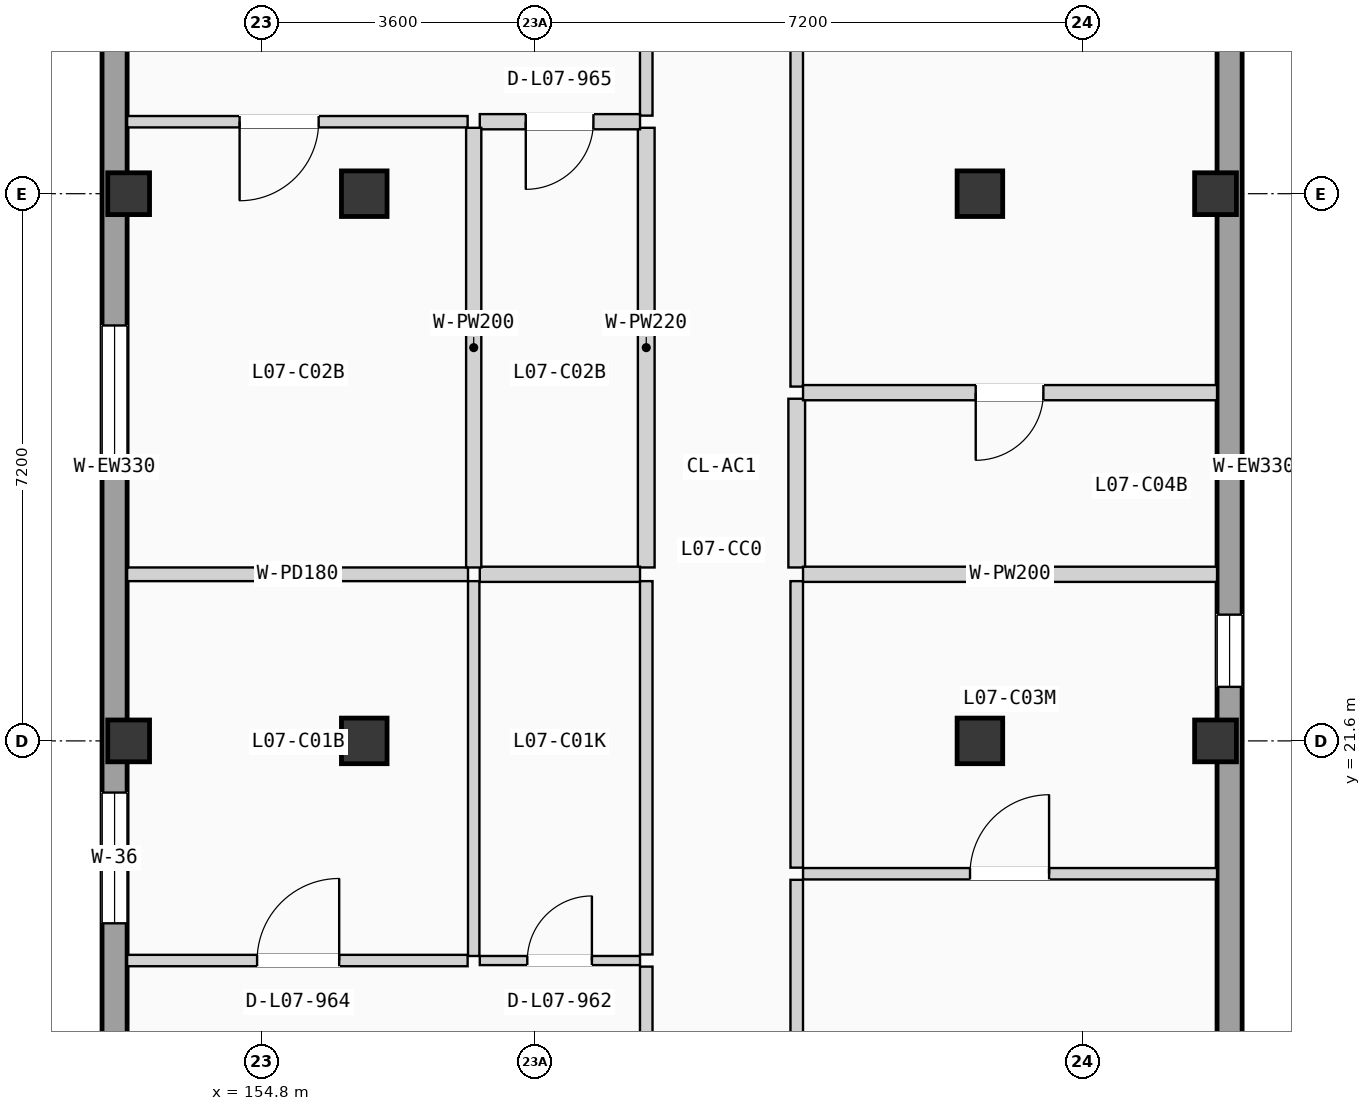
"""IFC4 building model, lengths in metres.
Left out: names, types, materials, properties, quantities, classifications, styles, units other than length and angle.
Written with IfcOpenShell. Run it as: python <this file> out.ifc"""

import sys

from ifc_helpers import new_model, si_unit, direction, frame, frame_2d, origin, origin_2d, place, context, subcontext, project, spatial, rectangle, extrude, element, fill, save


model = new_model("IFC4")
c1 = context("Model", 3, precision=1e-05, world=origin(), true_north=direction((0.0, 1.0)))
c2 = subcontext(c1, "Body", "Model", "MODEL_VIEW")
j1 = project(units=[si_unit("LENGTHUNIT", "METRE"), si_unit("PLANEANGLEUNIT", "RADIAN")], contexts=[c1])
p1 = place(None, origin())
s1 = spatial("IfcSite", under=j1, at=p1, CompositionType="ELEMENT")
p2 = place(p1, origin())
s2 = spatial("IfcBuilding", under=s1, at=p2, CompositionType="ELEMENT")
p3 = place(p2, frame((0.0, 0.0, 24.675)))
s3 = spatial("IfcBuildingStorey", under=s2, at=p3, CompositionType="ELEMENT", Elevation=24.675)
for number, where, z_axis, x_axis in (
    (1, (153.05, 21.6, 0.0), (0.0, 0.0, 1.0), (1.0, 0.0, 0.0)),
    (2, (153.05, 28.8, 0.0), (0.0, 0.0, 1.0), (1.0, 0.0, 0.0)),
):
    element("IfcColumn", number, at=place(p3, frame(where, z_axis=z_axis, x_axis=x_axis)), inside=s3, PredefinedType="COLUMN", context=c2, shape_type="SweptSolid", body=[
        extrude(rectangle(XDim=0.55, YDim=0.55, at=origin_2d()), origin(), (0.0, 0.0, 1.0), 3.15),
    ])
for number, where, z_axis, x_axis in (
    (3, (156.15, 21.6, 0.0), (0.0, 0.0, 1.0), (1.0, 0.0, 0.0)),
    (4, (156.15, 28.8, 0.0), (0.0, 0.0, 1.0), (1.0, 0.0, 0.0)),
    (5, (164.25, 21.6, 0.0), (0.0, 0.0, 1.0), (1.0, 0.0, 0.0)),
    (6, (164.25, 28.8, 0.0), (0.0, 0.0, 1.0), (1.0, 0.0, 0.0)),
):
    element("IfcColumn", number, at=place(p3, frame(where, z_axis=z_axis, x_axis=x_axis)), inside=s3, PredefinedType="COLUMN", context=c2, shape_type="SweptSolid", body=[
        extrude(rectangle(XDim=0.6, YDim=0.6, at=origin_2d()), origin(), (0.0, 0.0, 1.0), 3.15),
    ])
for number, where, z_axis, x_axis in (
    (7, (167.35, 21.6, 0.0), (0.0, 0.0, 1.0), (1.0, 0.0, 0.0)),
    (8, (167.35, 28.8, 0.0), (0.0, 0.0, 1.0), (1.0, 0.0, 0.0)),
):
    element("IfcColumn", number, at=place(p3, frame(where, z_axis=z_axis, x_axis=x_axis)), inside=s3, PredefinedType="COLUMN", context=c2, shape_type="SweptSolid", body=[
        extrude(rectangle(XDim=0.55, YDim=0.55, at=origin_2d()), origin(), (0.0, 0.0, 1.0), 3.15),
    ])
p4 = place(p3, frame((152.865, 0.33, 0.0), z_axis=(0.0, 0.0, 1.0), x_axis=(0.0, 1.0, 0.0)))
e9 = element("IfcWall", 9, at=p4, inside=s3, PredefinedType="SOLIDWALL", context=c2, shape_type="SweptSolid", body=[
    extrude(rectangle(XDim=49.74, YDim=0.33, at=frame_2d((24.87, 0.0))), origin(), (0.0, 0.0, 1.0), 2.9),
])
p5 = place(p4, frame((15.52, 0.0, 0.565)))
e10 = element("IfcOpeningElement", 10, at=p5, cuts=e9, PredefinedType="OPENING", context=c2, shape_type="SweptSolid", body=[
    extrude(rectangle(XDim=1.6, YDim=1.65, at=frame_2d((0.8, 0.825))), frame((0.0, 0.175, 0.0), z_axis=(0.0, -1.0, 0.0), x_axis=(1.0, 0.0, 0.0)), (0.0, 0.0, 1.0), 0.35),
])
p6 = place(p4, frame((9.251, 0.0, 0.85)))
e11 = element("IfcOpeningElement", 11, at=p6, cuts=e9, PredefinedType="OPENING", context=c2, shape_type="SweptSolid", body=[
    extrude(rectangle(XDim=0.95, YDim=1.2, at=frame_2d((0.475, 0.6))), frame((0.0, 0.175, 0.0), z_axis=(0.0, -1.0, 0.0), x_axis=(1.0, 0.0, 0.0)), (0.0, 0.0, 1.0), 0.35),
])
p7 = place(p4, frame((18.87, 0.0, 0.9)))
e12 = element("IfcOpeningElement", 12, at=p7, cuts=e9, PredefinedType="OPENING", context=c2, shape_type="SweptSolid", body=[
    extrude(rectangle(XDim=1.72, YDim=1.2, at=frame_2d((0.86, 0.6))), frame((0.0, 0.175, 0.0), z_axis=(0.0, -1.0, 0.0), x_axis=(1.0, 0.0, 0.0)), (0.0, 0.0, 1.0), 0.35),
])
p8 = place(p4, frame((31.588, 0.0, 0.865)))
e13 = element("IfcOpeningElement", 13, at=p8, cuts=e9, PredefinedType="OPENING", context=c2, shape_type="SweptSolid", body=[
    extrude(rectangle(XDim=1.72, YDim=1.35, at=frame_2d((0.86, 0.675))), frame((0.0, 0.175, 0.0), z_axis=(0.0, -1.0, 0.0), x_axis=(1.0, 0.0, 0.0)), (0.0, 0.0, 1.0), 0.35),
])
p9 = place(p4, frame((25.016, 0.0, 0.715)))
e14 = element("IfcOpeningElement", 14, at=p9, cuts=e9, PredefinedType="OPENING", context=c2, shape_type="SweptSolid", body=[
    extrude(rectangle(XDim=1.72, YDim=1.5, at=frame_2d((0.86, 0.75))), frame((0.0, 0.175, 0.0), z_axis=(0.0, -1.0, 0.0), x_axis=(1.0, 0.0, 0.0)), (0.0, 0.0, 1.0), 0.35),
])
p10 = place(p4, frame((38.718, 0.0, 0.565)))
e15 = element("IfcOpeningElement", 15, at=p10, cuts=e9, PredefinedType="OPENING", context=c2, shape_type="SweptSolid", body=[
    extrude(rectangle(XDim=1.72, YDim=1.65, at=frame_2d((0.86, 0.825))), frame((0.0, 0.175, 0.0), z_axis=(0.0, -1.0, 0.0), x_axis=(1.0, 0.0, 0.0)), (0.0, 0.0, 1.0), 0.35),
])
p11 = place(p3, frame((167.535, 0.33, 0.0), z_axis=(0.0, 0.0, 1.0), x_axis=(0.0, 1.0, 0.0)))
e16 = element("IfcWall", 16, at=p11, inside=s3, PredefinedType="SOLIDWALL", context=c2, shape_type="SweptSolid", body=[
    extrude(rectangle(XDim=49.74, YDim=0.33, at=frame_2d((24.87, 0.0))), origin(), (0.0, 0.0, 1.0), 2.9),
])
p12 = place(p11, frame((16.416, 0.0, 0.85)))
e17 = element("IfcOpeningElement", 17, at=p12, cuts=e16, PredefinedType="OPENING", context=c2, shape_type="SweptSolid", body=[
    extrude(rectangle(XDim=0.95, YDim=1.2, at=frame_2d((0.475, 0.6))), frame((0.0, 0.175, 0.0), z_axis=(0.0, -1.0, 0.0), x_axis=(1.0, 0.0, 0.0)), (0.0, 0.0, 1.0), 0.35),
])
p13 = place(p11, frame((21.981, 0.0, 0.85)))
e18 = element("IfcOpeningElement", 18, at=p13, cuts=e16, PredefinedType="OPENING", context=c2, shape_type="SweptSolid", body=[
    extrude(rectangle(XDim=0.95, YDim=1.2, at=frame_2d((0.475, 0.6))), frame((0.0, 0.175, 0.0), z_axis=(0.0, -1.0, 0.0), x_axis=(1.0, 0.0, 0.0)), (0.0, 0.0, 1.0), 0.35),
])
p14 = place(p11, frame((31.145, 0.0, 0.865)))
e19 = element("IfcOpeningElement", 19, at=p14, cuts=e16, PredefinedType="OPENING", context=c2, shape_type="SweptSolid", body=[
    extrude(rectangle(XDim=1.85, YDim=1.35, at=frame_2d((0.925, 0.675))), frame((0.0, 0.175, 0.0), z_axis=(0.0, -1.0, 0.0), x_axis=(1.0, 0.0, 0.0)), (0.0, 0.0, 1.0), 0.35),
])
p15 = place(p3, frame((159.86, 12.672, 0.0), z_axis=(0.0, 0.0, 1.0), x_axis=(0.0, 1.0, 0.0)))
e20 = element("IfcWall", 20, at=p15, inside=s3, PredefinedType="PARTITIONING", context=c2, shape_type="SweptSolid", body=[
    extrude(rectangle(XDim=5.958, YDim=0.165, at=frame_2d((2.979, 0.0))), origin(), (0.0, 0.0, 1.0), 2.87),
])
p16 = place(p15, frame((2.454, 0.0, 0.0)))
e21 = element("IfcOpeningElement", 21, at=p16, cuts=e20, PredefinedType="OPENING", context=c2, shape_type="SweptSolid", body=[
    extrude(rectangle(XDim=1.05, YDim=2.13, at=frame_2d((0.525, 1.065))), frame((0.0, 0.093, 0.0), z_axis=(0.0, -1.0, 0.0), x_axis=(1.0, 0.0, 0.0)), (0.0, 0.0, 1.0), 0.185),
])
p17 = place(p3, frame((159.86, 18.79, 0.0), z_axis=(0.0, 0.0, 1.0), x_axis=(0.0, 1.0, 0.0)))
e22 = element("IfcWall", 22, at=p17, inside=s3, PredefinedType="PARTITIONING", context=c2, shape_type="SweptSolid", body=[
    extrude(rectangle(XDim=4.912, YDim=0.165, at=frame_2d((2.456, 0.0))), origin(), (0.0, 0.0, 1.0), 2.87),
])
p18 = place(p3, frame((159.86, 29.827, 0.0), z_axis=(0.0, 0.0, 1.0), x_axis=(0.0, 1.0, 0.0)))
e23 = element("IfcWall", 23, at=p18, inside=s3, PredefinedType="PARTITIONING", context=c2, shape_type="SweptSolid", body=[
    extrude(rectangle(XDim=7.028, YDim=0.165, at=frame_2d((3.514, 0.0))), origin(), (0.0, 0.0, 1.0), 2.87),
])
p19 = place(p18, frame((2.989, 0.0, 0.0)))
e24 = element("IfcOpeningElement", 24, at=p19, cuts=e23, PredefinedType="OPENING", context=c2, shape_type="SweptSolid", body=[
    extrude(rectangle(XDim=1.05, YDim=2.13, at=frame_2d((0.525, 1.065))), frame((0.0, 0.093, 0.0), z_axis=(0.0, -1.0, 0.0), x_axis=(1.0, 0.0, 0.0)), (0.0, 0.0, 1.0), 0.185),
])
p20 = place(p3, frame((159.86, 23.882, 0.0), z_axis=(0.0, 0.0, 1.0), x_axis=(0.0, 1.0, 0.0)))
e25 = element("IfcWall", 25, at=p20, inside=s3, PredefinedType="PLUMBINGWALL", context=c2, shape_type="SweptSolid", body=[
    extrude(rectangle(XDim=5.785, YDim=0.22, at=frame_2d((2.893, 0.0))), origin(), (0.0, 0.0, 1.0), 2.87),
])
p21 = place(p3, frame((161.84, 9.98, 0.0), z_axis=(0.0, 0.0, 1.0), x_axis=(0.0, 1.0, 0.0)))
e26 = element("IfcWall", 26, at=p21, inside=s3, PredefinedType="PARTITIONING", context=c2, shape_type="SweptSolid", body=[
    extrude(rectangle(XDim=9.792, YDim=0.165, at=frame_2d((4.896, 0.0))), origin(), (0.0, 0.0, 1.0), 2.87),
])
p22 = place(p21, frame((4.371, 0.0, 0.0)))
e27 = element("IfcOpeningElement", 27, at=p22, cuts=e26, PredefinedType="OPENING", context=c2, shape_type="SweptSolid", body=[
    extrude(rectangle(XDim=1.05, YDim=2.13, at=frame_2d((0.525, 1.065))), frame((0.0, 0.093, 0.0), z_axis=(0.0, -1.0, 0.0), x_axis=(1.0, 0.0, 0.0)), (0.0, 0.0, 1.0), 0.185),
])
p23 = place(p3, frame((161.84, 19.932, 0.0), z_axis=(0.0, 0.0, 1.0), x_axis=(0.0, 1.0, 0.0)))
e28 = element("IfcWall", 28, at=p23, inside=s3, PredefinedType="PARTITIONING", context=c2, shape_type="SweptSolid", body=[
    extrude(rectangle(XDim=3.77, YDim=0.165, at=frame_2d((1.885, 0.0))), origin(), (0.0, 0.0, 1.0), 2.87),
])
p24 = place(p3, frame((161.84, 23.882, 0.0), z_axis=(0.0, 0.0, 1.0), x_axis=(0.0, 1.0, 0.0)))
e29 = element("IfcWall", 29, at=p24, inside=s3, PredefinedType="PLUMBINGWALL", context=c2, shape_type="SweptSolid", body=[
    extrude(rectangle(XDim=2.22, YDim=0.22, at=frame_2d((1.11, 0.0))), origin(), (0.0, 0.0, 1.0), 2.87),
])
p25 = place(p3, frame((161.84, 26.262, 0.0), z_axis=(0.0, 0.0, 1.0), x_axis=(0.0, 1.0, 0.0)))
e30 = element("IfcWall", 30, at=p25, inside=s3, PredefinedType="PARTITIONING", context=c2, shape_type="SweptSolid", body=[
    extrude(rectangle(XDim=12.608, YDim=0.165, at=frame_2d((6.304, 0.0))), origin(), (0.0, 0.0, 1.0), 2.87),
])
p26 = place(p25, frame((5.779, 0.0, 0.0)))
e31 = element("IfcOpeningElement", 31, at=p26, cuts=e30, PredefinedType="OPENING", context=c2, shape_type="SweptSolid", body=[
    extrude(rectangle(XDim=1.05, YDim=2.13, at=frame_2d((0.525, 1.065))), frame((0.0, 0.093, 0.0), z_axis=(0.0, -1.0, 0.0), x_axis=(1.0, 0.0, 0.0)), (0.0, 0.0, 1.0), 0.185),
])
p27 = place(p3, frame((157.67, 18.71, 0.0), z_axis=(0.0, 0.0, 1.0), x_axis=(1.0, 0.0, 0.0)))
e32 = element("IfcWall", 32, at=p27, inside=s3, PredefinedType="PARTITIONING", context=c2, shape_type="SweptSolid", body=[
    extrude(rectangle(XDim=2.108, YDim=0.12, at=frame_2d((1.054, 0.0))), origin(), (0.0, 0.0, 1.0), 2.87),
])
p28 = place(p27, frame((0.625, 0.0, 0.0)))
e33 = element("IfcOpeningElement", 33, at=p28, cuts=e32, PredefinedType="OPENING", context=c2, shape_type="SweptSolid", body=[
    extrude(rectangle(XDim=0.85, YDim=2.01, at=frame_2d((0.425, 1.005))), frame((0.0, 0.07, 0.0), z_axis=(0.0, -1.0, 0.0), x_axis=(1.0, 0.0, 0.0)), (0.0, 0.0, 1.0), 0.14),
])
p29 = place(p3, frame((153.03, 18.71, 0.0), z_axis=(0.0, 0.0, 1.0), x_axis=(1.0, 0.0, 0.0)))
e34 = element("IfcWall", 34, at=p29, inside=s3, PredefinedType="PARTITIONING", context=c2, shape_type="SweptSolid", body=[
    extrude(rectangle(XDim=4.48, YDim=0.15, at=frame_2d((2.24, 0.0))), origin(), (0.0, 0.0, 1.0), 2.87),
])
p30 = place(p29, frame((1.71, 0.0, 0.0)))
e35 = element("IfcOpeningElement", 35, at=p30, cuts=e34, PredefinedType="OPENING", context=c2, shape_type="SweptSolid", body=[
    extrude(rectangle(XDim=1.08, YDim=2.1, at=frame_2d((0.54, 1.05))), frame((0.0, 0.085, 0.0), z_axis=(0.0, -1.0, 0.0), x_axis=(1.0, 0.0, 0.0)), (0.0, 0.0, 1.0), 0.17),
])
p31 = place(p3, frame((157.59, 18.77, 0.0), z_axis=(0.0, 0.0, 1.0), x_axis=(0.0, 1.0, 0.0)))
e36 = element("IfcWall", 36, at=p31, inside=s3, PredefinedType="PARTITIONING", context=c2, shape_type="SweptSolid", body=[
    extrude(rectangle(XDim=4.932, YDim=0.15, at=frame_2d((2.466, 0.0))), origin(), (0.0, 0.0, 1.0), 2.87),
])
p32 = place(p3, frame((157.67, 23.792, 0.0), z_axis=(0.0, 0.0, 1.0), x_axis=(1.0, 0.0, 0.0)))
e37 = element("IfcWall", 37, at=p32, inside=s3, PredefinedType="PLUMBINGWALL", context=c2, shape_type="SweptSolid", body=[
    extrude(rectangle(XDim=2.108, YDim=0.2, at=frame_2d((1.054, 0.0))), origin(), (0.0, 0.0, 1.0), 2.87),
])
p33 = place(p3, frame((153.03, 23.792, 0.0), z_axis=(0.0, 0.0, 1.0), x_axis=(1.0, 0.0, 0.0)))
e38 = element("IfcWall", 38, at=p33, inside=s3, PredefinedType="PARTITIONING", context=c2, shape_type="SweptSolid", body=[
    extrude(rectangle(XDim=4.485, YDim=0.18, at=frame_2d((2.242, 0.0))), origin(), (0.0, 0.0, 1.0), 2.87),
])
p34 = place(p3, frame((157.67, 29.747, 0.0), z_axis=(0.0, 0.0, 1.0), x_axis=(1.0, 0.0, 0.0)))
e39 = element("IfcWall", 39, at=p34, inside=s3, PredefinedType="PLUMBINGWALL", context=c2, shape_type="SweptSolid", body=[
    extrude(rectangle(XDim=2.108, YDim=0.2, at=frame_2d((1.054, 0.0))), origin(), (0.0, 0.0, 1.0), 2.87),
])
p35 = place(p34, frame((0.605, 0.0, 0.0)))
e40 = element("IfcOpeningElement", 40, at=p35, cuts=e39, PredefinedType="OPENING", context=c2, shape_type="SweptSolid", body=[
    extrude(rectangle(XDim=0.89, YDim=2.03, at=frame_2d((0.445, 1.015))), frame((0.0, 0.11, 0.0), z_axis=(0.0, -1.0, 0.0), x_axis=(1.0, 0.0, 0.0)), (0.0, 0.0, 1.0), 0.22),
])
p36 = place(p3, frame((153.03, 29.747, 0.0), z_axis=(0.0, 0.0, 1.0), x_axis=(1.0, 0.0, 0.0)))
e41 = element("IfcWall", 41, at=p36, inside=s3, PredefinedType="PARTITIONING", context=c2, shape_type="SweptSolid", body=[
    extrude(rectangle(XDim=4.48, YDim=0.15, at=frame_2d((2.24, 0.0))), origin(), (0.0, 0.0, 1.0), 2.87),
])
p37 = place(p36, frame((1.48, 0.0, 0.0)))
e42 = element("IfcOpeningElement", 42, at=p37, cuts=e41, PredefinedType="OPENING", context=c2, shape_type="SweptSolid", body=[
    extrude(rectangle(XDim=1.04, YDim=2.08, at=frame_2d((0.52, 1.04))), frame((0.0, 0.085, 0.0), z_axis=(0.0, -1.0, 0.0), x_axis=(1.0, 0.0, 0.0)), (0.0, 0.0, 1.0), 0.17),
])
p38 = place(p3, frame((157.59, 23.882, 0.0), z_axis=(0.0, 0.0, 1.0), x_axis=(0.0, 1.0, 0.0)))
e43 = element("IfcWall", 43, at=p38, inside=s3, PredefinedType="PLUMBINGWALL", context=c2, shape_type="SweptSolid", body=[
    extrude(rectangle(XDim=5.785, YDim=0.2, at=frame_2d((2.893, 0.0))), origin(), (0.0, 0.0, 1.0), 2.87),
])
p39 = place(p3, frame((161.923, 19.852, 0.0), z_axis=(0.0, 0.0, 1.0), x_axis=(1.0, 0.0, 0.0)))
e44 = element("IfcWall", 44, at=p39, inside=s3, PredefinedType="PARTITIONING", context=c2, shape_type="SweptSolid", body=[
    extrude(rectangle(XDim=5.447, YDim=0.15, at=frame_2d((2.724, 0.0))), origin(), (0.0, 0.0, 1.0), 2.87),
])
p40 = place(p39, frame((2.197, 0.0, 0.0)))
e45 = element("IfcOpeningElement", 45, at=p40, cuts=e44, PredefinedType="OPENING", context=c2, shape_type="SweptSolid", body=[
    extrude(rectangle(XDim=1.04, YDim=2.08, at=frame_2d((0.52, 1.04))), frame((0.0, 0.085, 0.0), z_axis=(0.0, -1.0, 0.0), x_axis=(1.0, 0.0, 0.0)), (0.0, 0.0, 1.0), 0.17),
])
p41 = place(p3, frame((161.923, 23.792, 0.0), z_axis=(0.0, 0.0, 1.0), x_axis=(1.0, 0.0, 0.0)))
e46 = element("IfcWall", 46, at=p41, inside=s3, PredefinedType="PLUMBINGWALL", context=c2, shape_type="SweptSolid", body=[
    extrude(rectangle(XDim=5.447, YDim=0.2, at=frame_2d((2.724, 0.0))), origin(), (0.0, 0.0, 1.0), 2.87),
])
p42 = place(p3, frame((161.923, 26.182, 0.0), z_axis=(0.0, 0.0, 1.0), x_axis=(1.0, 0.0, 0.0)))
e47 = element("IfcWall", 47, at=p42, inside=s3, PredefinedType="PLUMBINGWALL", context=c2, shape_type="SweptSolid", body=[
    extrude(rectangle(XDim=5.447, YDim=0.2, at=frame_2d((2.724, 0.0))), origin(), (0.0, 0.0, 1.0), 2.87),
])
p43 = place(p42, frame((2.272, 0.0, 0.0)))
e48 = element("IfcOpeningElement", 48, at=p43, cuts=e47, PredefinedType="OPENING", context=c2, shape_type="SweptSolid", body=[
    extrude(rectangle(XDim=0.89, YDim=2.03, at=frame_2d((0.445, 1.015))), frame((0.0, 0.11, 0.0), z_axis=(0.0, -1.0, 0.0), x_axis=(1.0, 0.0, 0.0)), (0.0, 0.0, 1.0), 0.22),
])
p44 = place(p7, origin())
e49 = element("IfcWindow", 49, at=p44, inside=s3, PartitioningType="DOUBLE_PANEL_VERTICAL", PredefinedType="WINDOW", context=c2, shape_type="SweptSolid", body=[
    extrude(rectangle(XDim=1.72, YDim=1.2, at=frame_2d((0.86, 0.6))), frame((0.0, 0.03, 0.0), z_axis=(0.0, -1.0, 0.0), x_axis=(1.0, 0.0, 0.0)), (0.0, 0.0, 1.0), 0.06),
])
fill(e12, e49)
p45 = place(p9, origin())
e50 = element("IfcWindow", 50, at=p45, inside=s3, PartitioningType="DOUBLE_PANEL_VERTICAL", PredefinedType="WINDOW", context=c2, shape_type="SweptSolid", body=[
    extrude(rectangle(XDim=1.72, YDim=1.5, at=frame_2d((0.86, 0.75))), frame((0.0, 0.03, 0.0), z_axis=(0.0, -1.0, 0.0), x_axis=(1.0, 0.0, 0.0)), (0.0, 0.0, 1.0), 0.06),
])
fill(e14, e50)
p46 = place(p13, origin())
e51 = element("IfcWindow", 51, at=p46, inside=s3, PartitioningType="SINGLE_PANEL", PredefinedType="WINDOW", context=c2, shape_type="SweptSolid", body=[
    extrude(rectangle(XDim=0.95, YDim=1.2, at=frame_2d((0.475, 0.6))), frame((0.0, 0.03, 0.0), z_axis=(0.0, -1.0, 0.0), x_axis=(1.0, 0.0, 0.0)), (0.0, 0.0, 1.0), 0.06),
])
fill(e18, e51)
p47 = place(p28, origin())
e52 = element("IfcDoor", 52, at=p47, inside=s3, OperationType="SINGLE_SWING_RIGHT", PredefinedType="DOOR", context=c2, shape_type="SweptSolid", body=[
    extrude(rectangle(XDim=0.85, YDim=2.01, at=frame_2d((0.425, 1.005))), frame((0.0, 0.025, 0.0), z_axis=(0.0, -1.0, 0.0), x_axis=(1.0, 0.0, 0.0)), (0.0, 0.0, 1.0), 0.05),
])
fill(e33, e52)
p48 = place(p30, origin())
e53 = element("IfcDoor", 53, at=p48, inside=s3, OperationType="SINGLE_SWING_RIGHT", PredefinedType="DOOR", context=c2, shape_type="SweptSolid", body=[
    extrude(rectangle(XDim=1.08, YDim=2.1, at=frame_2d((0.54, 1.05))), frame((0.0, 0.025, 0.0), z_axis=(0.0, -1.0, 0.0), x_axis=(1.0, 0.0, 0.0)), (0.0, 0.0, 1.0), 0.05),
])
fill(e35, e53)
p49 = place(p35, frame((0.89, 0.0, 0.0), z_axis=(0.0, 0.0, 1.0), x_axis=(-1.0, 0.0, 0.0)))
e54 = element("IfcDoor", 54, at=p49, inside=s3, OperationType="SINGLE_SWING_LEFT", PredefinedType="DOOR", context=c2, shape_type="SweptSolid", body=[
    extrude(rectangle(XDim=0.89, YDim=2.03, at=frame_2d((0.445, 1.015))), frame((0.0, 0.025, 0.0), z_axis=(0.0, -1.0, 0.0), x_axis=(1.0, 0.0, 0.0)), (0.0, 0.0, 1.0), 0.05),
])
fill(e40, e54)
p50 = place(p37, frame((1.04, 0.0, 0.0), z_axis=(0.0, 0.0, 1.0), x_axis=(-1.0, 0.0, 0.0)))
e55 = element("IfcDoor", 55, at=p50, inside=s3, OperationType="SINGLE_SWING_LEFT", PredefinedType="DOOR", context=c2, shape_type="SweptSolid", body=[
    extrude(rectangle(XDim=1.04, YDim=2.08, at=frame_2d((0.52, 1.04))), frame((0.0, 0.025, 0.0), z_axis=(0.0, -1.0, 0.0), x_axis=(1.0, 0.0, 0.0)), (0.0, 0.0, 1.0), 0.05),
])
fill(e42, e55)
p51 = place(p40, origin())
e56 = element("IfcDoor", 56, at=p51, inside=s3, OperationType="SINGLE_SWING_RIGHT", PredefinedType="DOOR", context=c2, shape_type="SweptSolid", body=[
    extrude(rectangle(XDim=1.04, YDim=2.08, at=frame_2d((0.52, 1.04))), frame((0.0, 0.025, 0.0), z_axis=(0.0, -1.0, 0.0), x_axis=(1.0, 0.0, 0.0)), (0.0, 0.0, 1.0), 0.05),
])
fill(e45, e56)
p52 = place(p43, frame((0.89, 0.0, 0.0), z_axis=(0.0, 0.0, 1.0), x_axis=(-1.0, 0.0, 0.0)))
e57 = element("IfcDoor", 57, at=p52, inside=s3, OperationType="SINGLE_SWING_LEFT", PredefinedType="DOOR", context=c2, shape_type="SweptSolid", body=[
    extrude(rectangle(XDim=0.89, YDim=2.03, at=frame_2d((0.445, 1.015))), frame((0.0, 0.025, 0.0), z_axis=(0.0, -1.0, 0.0), x_axis=(1.0, 0.0, 0.0)), (0.0, 0.0, 1.0), 0.05),
])
fill(e48, e57)
save(model, sys.argv[1])
